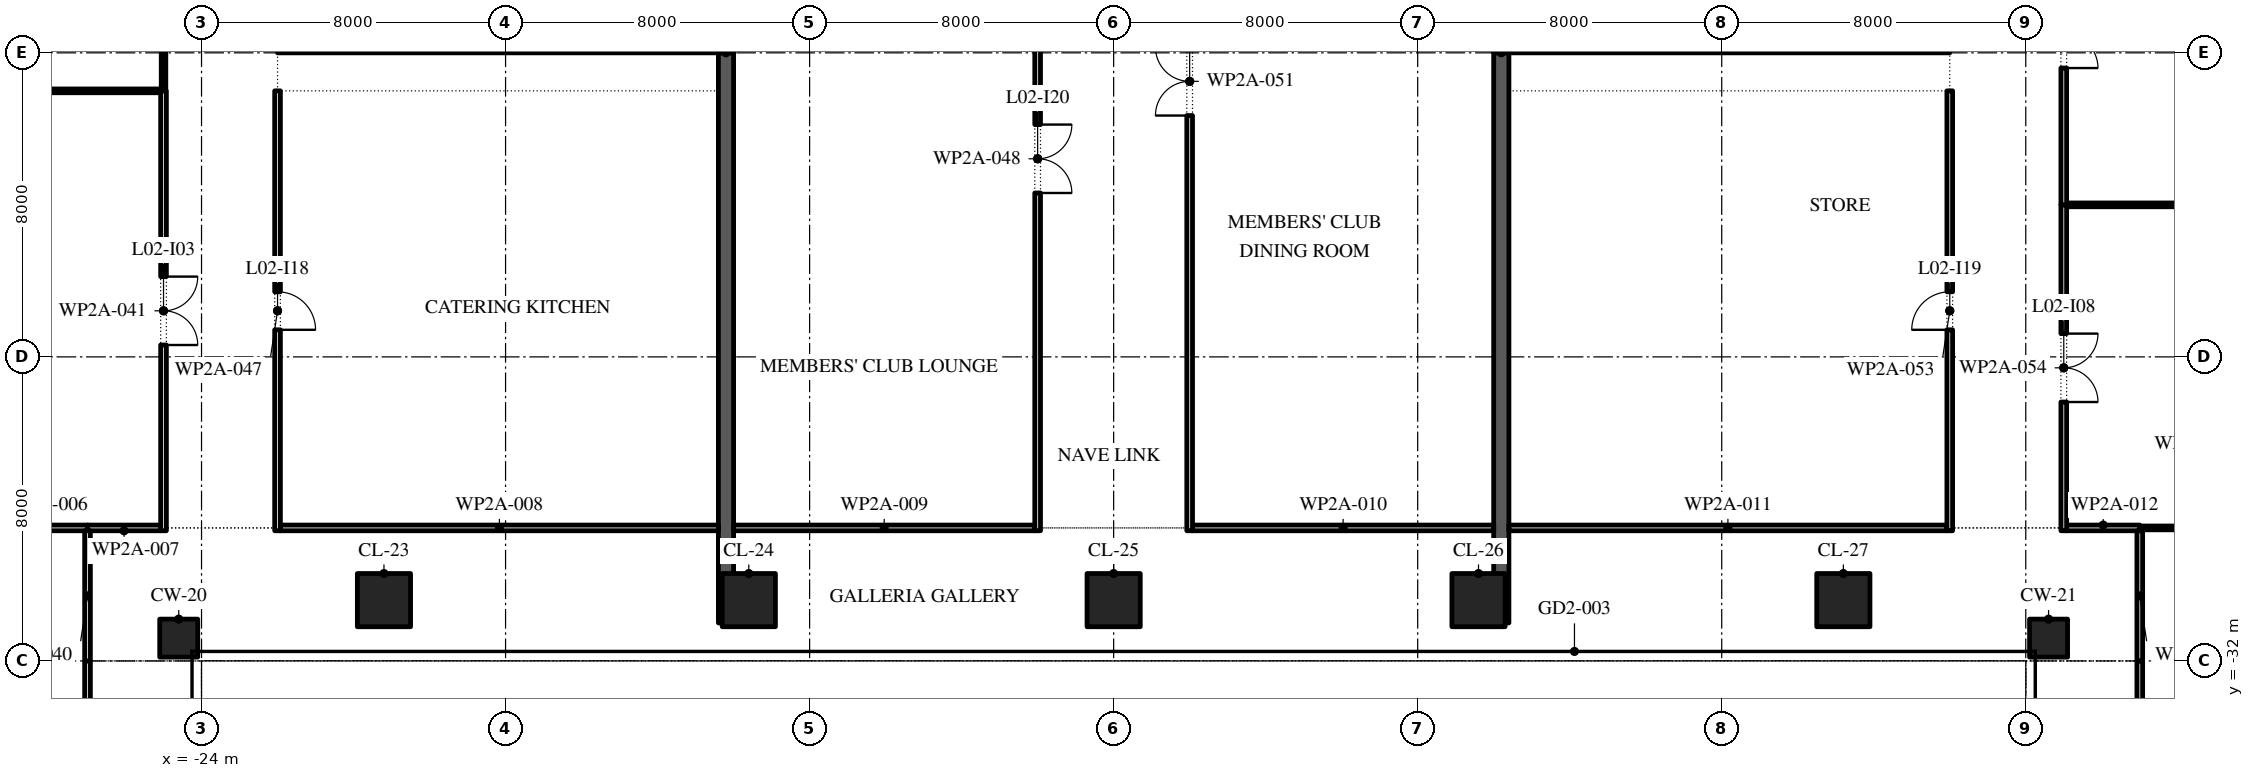
"""IFC4 building model, lengths in metres.
Left out: names, types, materials, properties, quantities, classifications, styles, units other than length and angle.
Written with IfcOpenShell. Run it as: python <this file> out.ifc"""

import sys

from ifc_helpers import new_model, si_unit, direction, frame, frame_2d, origin, origin_2d, place, context, subcontext, project, spatial, rectangle, extrude, element, fill, save


model = new_model("IFC4")
c1 = context("Model", 3, precision=1e-05, world=origin(), true_north=direction((0.0, 1.0)))
c2 = subcontext(c1, "Body", "Model", "MODEL_VIEW")
j1 = project(units=[si_unit("LENGTHUNIT", "METRE"), si_unit("PLANEANGLEUNIT", "RADIAN")], contexts=[c1])
p1 = place(None, origin())
s1 = spatial("IfcSite", under=j1, at=p1, CompositionType="ELEMENT")
p2 = place(p1, origin())
s2 = spatial("IfcBuilding", under=s1, at=p2, CompositionType="ELEMENT")
p3 = place(p2, frame((0.0, 0.0, 14.0)))
s3 = spatial("IfcBuildingStorey", under=s2, at=p3, CompositionType="ELEMENT", Elevation=14.0)
for number, where, z_axis, x_axis in (
    (1, (-24.6, -31.4, 0.0), (0.0, 0.0, 1.0), (1.0, 0.0, 0.0)),
    (2, (24.6, -31.4, 0.0), (0.0, 0.0, 1.0), (1.0, 0.0, 0.0)),
):
    element("IfcColumn", number, at=place(p3, frame(where, z_axis=z_axis, x_axis=x_axis)), inside=s3, PredefinedType="COLUMN", context=c2, shape_type="SweptSolid", body=[
        extrude(rectangle(XDim=1.0, YDim=1.0, at=origin_2d()), origin(), (0.0, 0.0, 1.0), 5.2),
    ])
for number, where, z_axis, x_axis in (
    (3, (-19.2, -30.4, 0.0), (0.0, 0.0, 1.0), (1.0, 0.0, 0.0)),
    (4, (-9.6, -30.4, 0.0), (0.0, 0.0, 1.0), (1.0, 0.0, 0.0)),
    (5, (0.0, -30.4, 0.0), (0.0, 0.0, 1.0), (1.0, 0.0, 0.0)),
    (6, (9.6, -30.4, 0.0), (0.0, 0.0, 1.0), (1.0, 0.0, 0.0)),
    (7, (19.2, -30.4, 0.0), (0.0, 0.0, 1.0), (1.0, 0.0, 0.0)),
):
    element("IfcColumn", number, at=place(p3, frame(where, z_axis=z_axis, x_axis=x_axis)), inside=s3, PredefinedType="COLUMN", context=c2, shape_type="SweptSolid", body=[
        extrude(rectangle(XDim=1.4, YDim=1.4, at=origin_2d()), origin(), (0.0, 0.0, 1.0), 5.2),
    ])
for number, where, z_axis, x_axis in (
    (8, (-10.2, -31.0, 0.0), (0.0, 0.0, 1.0), (0.0, 1.0, 0.0)),
    (9, (10.2, -31.0, 0.0), (0.0, 0.0, 1.0), (0.0, 1.0, 0.0)),
):
    element("IfcWall", number, at=place(p3, frame(where, z_axis=z_axis, x_axis=x_axis)), inside=s3, PredefinedType="SHEAR", context=c2, shape_type="SweptSolid", body=[
        extrude(rectangle(XDim=15.0, YDim=0.4, at=frame_2d((7.5, 0.0))), origin(), (0.0, 0.0, 1.0), 4.9),
    ])
p4 = place(p3, frame((-29.9, -28.5, 0.0), z_axis=(0.0, 0.0, 1.0), x_axis=(1.0, 0.0, 0.0)))
e10 = element("IfcWall", 10, at=p4, inside=s3, PredefinedType="PARTITIONING", context=c2, shape_type="SweptSolid", body=[
    extrude(rectangle(XDim=2.9, YDim=0.15, at=frame_2d((1.45, 0.0))), origin(), (0.0, 0.0, 1.0), 4.9),
])
p5 = place(p3, frame((-27.0, -28.5, 0.0), z_axis=(0.0, 0.0, 1.0), x_axis=(1.0, 0.0, 0.0)))
e11 = element("IfcWall", 11, at=p5, inside=s3, PredefinedType="PARTITIONING", context=c2, shape_type="SweptSolid", body=[
    extrude(rectangle(XDim=1.925, YDim=0.15, at=frame_2d((0.962, 0.0))), origin(), (0.0, 0.0, 1.0), 4.9),
])
p6 = place(p3, frame((-21.925, -28.5, 0.0), z_axis=(0.0, 0.0, 1.0), x_axis=(1.0, 0.0, 0.0)))
e12 = element("IfcWall", 12, at=p6, inside=s3, PredefinedType="PARTITIONING", context=c2, shape_type="SweptSolid", body=[
    extrude(rectangle(XDim=11.525, YDim=0.15, at=frame_2d((5.763, 0.0))), origin(), (0.0, 0.0, 1.0), 4.9),
])
for number, where, z_axis, x_axis in (
    (13, (-10.0, -28.5, 0.0), (0.0, 0.0, 1.0), (1.0, 0.0, 0.0)),
    (14, (2.075, -28.5, 0.0), (0.0, 0.0, 1.0), (1.0, 0.0, 0.0)),
):
    element("IfcWall", number, at=place(p3, frame(where, z_axis=z_axis, x_axis=x_axis)), inside=s3, PredefinedType="PARTITIONING", context=c2, shape_type="SweptSolid", body=[
        extrude(rectangle(XDim=7.925, YDim=0.15, at=frame_2d((3.962, 0.0))), origin(), (0.0, 0.0, 1.0), 4.9),
    ])
p7 = place(p3, frame((10.4, -28.5, 0.0), z_axis=(0.0, 0.0, 1.0), x_axis=(1.0, 0.0, 0.0)))
e15 = element("IfcWall", 15, at=p7, inside=s3, PredefinedType="PARTITIONING", context=c2, shape_type="SweptSolid", body=[
    extrude(rectangle(XDim=11.525, YDim=0.15, at=frame_2d((5.763, 0.0))), origin(), (0.0, 0.0, 1.0), 4.9),
])
p8 = place(p3, frame((25.075, -28.5, 0.0), z_axis=(0.0, 0.0, 1.0), x_axis=(1.0, 0.0, 0.0)))
e16 = element("IfcWall", 16, at=p8, inside=s3, PredefinedType="PARTITIONING", context=c2, shape_type="SweptSolid", body=[
    extrude(rectangle(XDim=1.925, YDim=0.15, at=frame_2d((0.962, 0.0))), origin(), (0.0, 0.0, 1.0), 4.9),
])
p9 = place(p3, frame((27.0, -28.5, 0.0), z_axis=(0.0, 0.0, 1.0), x_axis=(1.0, 0.0, 0.0)))
e17 = element("IfcWall", 17, at=p9, inside=s3, PredefinedType="PARTITIONING", context=c2, shape_type="SweptSolid", body=[
    extrude(rectangle(XDim=2.9, YDim=0.1, at=frame_2d((1.45, 0.0))), origin(), (0.0, 0.0, 1.0), 4.9),
])
for number, where, z_axis, x_axis in (
    (18, (25.075, -20.0, 0.0), (0.0, 0.0, 1.0), (1.0, 0.0, 0.0)),
    (19, (-43.5, -17.0, 0.0), (0.0, 0.0, 1.0), (1.0, 0.0, 0.0)),
):
    element("IfcWall", number, at=place(p3, frame(where, z_axis=z_axis, x_axis=x_axis)), inside=s3, PredefinedType="PARTITIONING", context=c2, shape_type="SweptSolid", body=[
        extrude(rectangle(XDim=18.425, YDim=0.1, at=frame_2d((9.212, 0.0))), origin(), (0.0, 0.0, 1.0), 4.9),
    ])
p10 = place(p3, frame((-27.0, -42.0, 0.0), z_axis=(0.0, 0.0, 1.0), x_axis=(0.0, 1.0, 0.0)))
e20 = element("IfcWall", 20, at=p10, inside=s3, PredefinedType="PARTITIONING", context=c2, shape_type="SweptSolid", body=[
    extrude(rectangle(XDim=10.0, YDim=0.15, at=frame_2d((5.0, 0.0))), origin(), (0.0, 0.0, 1.0), 4.9),
])
p11 = place(p10, frame((4.1, 0.0, 0.0)))
e21 = element("IfcOpeningElement", 21, at=p11, cuts=e20, PredefinedType="OPENING", context=c2, shape_type="SweptSolid", body=[
    extrude(rectangle(XDim=1.8, YDim=2.1, at=frame_2d((0.9, 1.05))), frame((0.0, 0.085, 0.0), z_axis=(0.0, -1.0, 0.0), x_axis=(1.0, 0.0, 0.0)), (0.0, 0.0, 1.0), 0.17),
])
p12 = place(p3, frame((-27.0, -32.0, 0.0), z_axis=(0.0, 0.0, 1.0), x_axis=(0.0, 1.0, 0.0)))
e22 = element("IfcWall", 22, at=p12, inside=s3, PredefinedType="PARTITIONING", context=c2, shape_type="SweptSolid", body=[
    extrude(rectangle(XDim=3.425, YDim=0.15, at=frame_2d((1.712, 0.0))), origin(), (0.0, 0.0, 1.0), 4.9),
])
p13 = place(p3, frame((-25.0, -28.575, 0.0), z_axis=(0.0, 0.0, 1.0), x_axis=(0.0, 1.0, 0.0)))
e23 = element("IfcWall", 23, at=p13, inside=s3, PredefinedType="PARTITIONING", context=c2, shape_type="SweptSolid", body=[
    extrude(rectangle(XDim=11.575, YDim=0.15, at=frame_2d((5.788, 0.0))), origin(), (0.0, 0.0, 1.0), 4.9),
])
p14 = place(p13, frame((4.887, 0.0, 0.0)))
e24 = element("IfcOpeningElement", 24, at=p14, cuts=e23, PredefinedType="OPENING", context=c2, shape_type="SweptSolid", body=[
    extrude(rectangle(XDim=1.8, YDim=2.1, at=frame_2d((0.9, 1.05))), frame((0.0, 0.085, 0.0), z_axis=(0.0, -1.0, 0.0), x_axis=(1.0, 0.0, 0.0)), (0.0, 0.0, 1.0), 0.17),
])
p15 = place(p3, frame((-25.0, -17.0, 0.0), z_axis=(0.0, 0.0, 1.0), x_axis=(0.0, 1.0, 0.0)))
e25 = element("IfcWall", 25, at=p15, inside=s3, PredefinedType="PARTITIONING", context=c2, shape_type="SweptSolid", body=[
    extrude(rectangle(XDim=11.0, YDim=0.12, at=frame_2d((5.5, 0.0))), origin(), (0.0, 0.0, 1.0), 4.9),
])
p16 = place(p15, frame((4.6, 0.0, 0.0)))
e26 = element("IfcOpeningElement", 26, at=p16, cuts=e25, PredefinedType="OPENING", context=c2, shape_type="SweptSolid", body=[
    extrude(rectangle(XDim=1.8, YDim=2.1, at=frame_2d((0.9, 1.05))), frame((0.0, 0.07, 0.0), z_axis=(0.0, -1.0, 0.0), x_axis=(1.0, 0.0, 0.0)), (0.0, 0.0, 1.0), 0.14),
])
p17 = place(p3, frame((-22.0, -28.575, 0.0), z_axis=(0.0, 0.0, 1.0), x_axis=(0.0, 1.0, 0.0)))
e27 = element("IfcWall", 27, at=p17, inside=s3, PredefinedType="PARTITIONING", context=c2, shape_type="SweptSolid", body=[
    extrude(rectangle(XDim=11.575, YDim=0.15, at=frame_2d((5.788, 0.0))), origin(), (0.0, 0.0, 1.0), 4.9),
])
p18 = place(p17, frame((5.288, 0.0, 0.0)))
e28 = element("IfcOpeningElement", 28, at=p18, cuts=e27, PredefinedType="OPENING", context=c2, shape_type="SweptSolid", body=[
    extrude(rectangle(XDim=1.0, YDim=2.1, at=frame_2d((0.5, 1.05))), frame((0.0, 0.085, 0.0), z_axis=(0.0, -1.0, 0.0), x_axis=(1.0, 0.0, 0.0)), (0.0, 0.0, 1.0), 0.17),
])
p19 = place(p3, frame((-2.0, -28.575, 0.0), z_axis=(0.0, 0.0, 1.0), x_axis=(0.0, 1.0, 0.0)))
e29 = element("IfcWall", 29, at=p19, inside=s3, PredefinedType="PARTITIONING", context=c2, shape_type="SweptSolid", body=[
    extrude(rectangle(XDim=19.575, YDim=0.15, at=frame_2d((9.788, 0.0))), origin(), (0.0, 0.0, 1.0), 4.9),
])
p20 = place(p19, frame((8.887, 0.0, 0.0)))
e30 = element("IfcOpeningElement", 30, at=p20, cuts=e29, PredefinedType="OPENING", context=c2, shape_type="SweptSolid", body=[
    extrude(rectangle(XDim=1.8, YDim=2.1, at=frame_2d((0.9, 1.05))), frame((0.0, 0.085, 0.0), z_axis=(0.0, -1.0, 0.0), x_axis=(1.0, 0.0, 0.0)), (0.0, 0.0, 1.0), 0.17),
])
p21 = place(p3, frame((2.0, -28.575, 0.0), z_axis=(0.0, 0.0, 1.0), x_axis=(0.0, 1.0, 0.0)))
e31 = element("IfcWall", 31, at=p21, inside=s3, PredefinedType="PARTITIONING", context=c2, shape_type="SweptSolid", body=[
    extrude(rectangle(XDim=23.65, YDim=0.15, at=frame_2d((11.825, 0.0))), origin(), (0.0, 0.0, 1.0), 4.9),
])
p22 = place(p21, frame((10.925, 0.0, 0.0)))
e32 = element("IfcOpeningElement", 32, at=p22, cuts=e31, PredefinedType="OPENING", context=c2, shape_type="SweptSolid", body=[
    extrude(rectangle(XDim=1.8, YDim=2.1, at=frame_2d((0.9, 1.05))), frame((0.0, 0.085, 0.0), z_axis=(0.0, -1.0, 0.0), x_axis=(1.0, 0.0, 0.0)), (0.0, 0.0, 1.0), 0.17),
])
p23 = place(p3, frame((22.0, -28.575, 0.0), z_axis=(0.0, 0.0, 1.0), x_axis=(0.0, 1.0, 0.0)))
e33 = element("IfcWall", 33, at=p23, inside=s3, PredefinedType="PARTITIONING", context=c2, shape_type="SweptSolid", body=[
    extrude(rectangle(XDim=11.575, YDim=0.15, at=frame_2d((5.788, 0.0))), origin(), (0.0, 0.0, 1.0), 4.9),
])
p24 = place(p23, frame((5.288, 0.0, 0.0)))
e34 = element("IfcOpeningElement", 34, at=p24, cuts=e33, PredefinedType="OPENING", context=c2, shape_type="SweptSolid", body=[
    extrude(rectangle(XDim=1.0, YDim=2.1, at=frame_2d((0.5, 1.05))), frame((0.0, 0.085, 0.0), z_axis=(0.0, -1.0, 0.0), x_axis=(1.0, 0.0, 0.0)), (0.0, 0.0, 1.0), 0.17),
])
p25 = place(p3, frame((25.0, -28.575, 0.0), z_axis=(0.0, 0.0, 1.0), x_axis=(0.0, 1.0, 0.0)))
e35 = element("IfcWall", 35, at=p25, inside=s3, PredefinedType="PARTITIONING", context=c2, shape_type="SweptSolid", body=[
    extrude(rectangle(XDim=8.575, YDim=0.15, at=frame_2d((4.288, 0.0))), origin(), (0.0, 0.0, 1.0), 4.9),
])
p26 = place(p25, frame((3.387, 0.0, 0.0)))
e36 = element("IfcOpeningElement", 36, at=p26, cuts=e35, PredefinedType="OPENING", context=c2, shape_type="SweptSolid", body=[
    extrude(rectangle(XDim=1.8, YDim=2.1, at=frame_2d((0.9, 1.05))), frame((0.0, 0.085, 0.0), z_axis=(0.0, -1.0, 0.0), x_axis=(1.0, 0.0, 0.0)), (0.0, 0.0, 1.0), 0.17),
])
p27 = place(p3, frame((25.0, -20.0, 0.0), z_axis=(0.0, 0.0, 1.0), x_axis=(0.0, 1.0, 0.0)))
e37 = element("IfcWall", 37, at=p27, inside=s3, PredefinedType="PARTITIONING", context=c2, shape_type="SweptSolid", body=[
    extrude(rectangle(XDim=9.0, YDim=0.15, at=frame_2d((4.5, 0.0))), origin(), (0.0, 0.0, 1.0), 4.9),
])
p28 = place(p27, frame((3.6, 0.0, 0.0)))
e38 = element("IfcOpeningElement", 38, at=p28, cuts=e37, PredefinedType="OPENING", context=c2, shape_type="SweptSolid", body=[
    extrude(rectangle(XDim=1.8, YDim=2.1, at=frame_2d((0.9, 1.05))), frame((0.0, 0.085, 0.0), z_axis=(0.0, -1.0, 0.0), x_axis=(1.0, 0.0, 0.0)), (0.0, 0.0, 1.0), 0.17),
])
p29 = place(p3, frame((27.0, -42.0, 0.0), z_axis=(0.0, 0.0, 1.0), x_axis=(0.0, 1.0, 0.0)))
e39 = element("IfcWall", 39, at=p29, inside=s3, PredefinedType="PARTITIONING", context=c2, shape_type="SweptSolid", body=[
    extrude(rectangle(XDim=10.0, YDim=0.15, at=frame_2d((5.0, 0.0))), origin(), (0.0, 0.0, 1.0), 4.9),
])
p30 = place(p29, frame((4.1, 0.0, 0.0)))
e40 = element("IfcOpeningElement", 40, at=p30, cuts=e39, PredefinedType="OPENING", context=c2, shape_type="SweptSolid", body=[
    extrude(rectangle(XDim=1.8, YDim=2.1, at=frame_2d((0.9, 1.05))), frame((0.0, 0.085, 0.0), z_axis=(0.0, -1.0, 0.0), x_axis=(1.0, 0.0, 0.0)), (0.0, 0.0, 1.0), 0.17),
])
p31 = place(p3, frame((27.0, -32.0, 0.0), z_axis=(0.0, 0.0, 1.0), x_axis=(0.0, 1.0, 0.0)))
e41 = element("IfcWall", 41, at=p31, inside=s3, PredefinedType="PARTITIONING", context=c2, shape_type="SweptSolid", body=[
    extrude(rectangle(XDim=3.425, YDim=0.15, at=frame_2d((1.712, 0.0))), origin(), (0.0, 0.0, 1.0), 4.9),
])
p32 = place(p14, frame((1.8, 0.0, 0.0), z_axis=(0.0, 0.0, 1.0), x_axis=(-1.0, 0.0, 0.0)))
e42 = element("IfcDoor", 42, at=p32, inside=s3, OperationType="SINGLE_SWING_RIGHT", PredefinedType="DOOR", context=c2, shape_type="SweptSolid", body=[
    extrude(rectangle(XDim=1.8, YDim=2.1, at=frame_2d((0.9, 1.05))), frame((0.0, 0.025, 0.0), z_axis=(0.0, -1.0, 0.0), x_axis=(1.0, 0.0, 0.0)), (0.0, 0.0, 1.0), 0.05),
])
fill(e24, e42)
p33 = place(p26, frame((1.8, 0.0, 0.0), z_axis=(0.0, 0.0, 1.0), x_axis=(-1.0, 0.0, 0.0)))
e43 = element("IfcDoor", 43, at=p33, inside=s3, OperationType="SINGLE_SWING_RIGHT", PredefinedType="DOOR", context=c2, shape_type="SweptSolid", body=[
    extrude(rectangle(XDim=1.8, YDim=2.1, at=frame_2d((0.9, 1.05))), frame((0.0, 0.025, 0.0), z_axis=(0.0, -1.0, 0.0), x_axis=(1.0, 0.0, 0.0)), (0.0, 0.0, 1.0), 0.05),
])
fill(e36, e43)
p34 = place(p28, frame((1.8, 0.0, 0.0), z_axis=(0.0, 0.0, 1.0), x_axis=(-1.0, 0.0, 0.0)))
e44 = element("IfcDoor", 44, at=p34, inside=s3, OperationType="SINGLE_SWING_RIGHT", PredefinedType="DOOR", context=c2, shape_type="SweptSolid", body=[
    extrude(rectangle(XDim=1.8, YDim=2.1, at=frame_2d((0.9, 1.05))), frame((0.0, 0.025, 0.0), z_axis=(0.0, -1.0, 0.0), x_axis=(1.0, 0.0, 0.0)), (0.0, 0.0, 1.0), 0.05),
])
fill(e38, e44)
p35 = place(p18, frame((1.0, 0.0, 0.0), z_axis=(0.0, 0.0, 1.0), x_axis=(-1.0, 0.0, 0.0)))
e45 = element("IfcDoor", 45, at=p35, inside=s3, OperationType="SINGLE_SWING_LEFT", PredefinedType="DOOR", context=c2, shape_type="SweptSolid", body=[
    extrude(rectangle(XDim=1.0, YDim=2.1, at=frame_2d((0.5, 1.05))), frame((0.0, 0.025, 0.0), z_axis=(0.0, -1.0, 0.0), x_axis=(1.0, 0.0, 0.0)), (0.0, 0.0, 1.0), 0.05),
])
fill(e28, e45)
p36 = place(p24, origin())
e46 = element("IfcDoor", 46, at=p36, inside=s3, OperationType="SINGLE_SWING_RIGHT", PredefinedType="DOOR", context=c2, shape_type="SweptSolid", body=[
    extrude(rectangle(XDim=1.0, YDim=2.1, at=frame_2d((0.5, 1.05))), frame((0.0, 0.025, 0.0), z_axis=(0.0, -1.0, 0.0), x_axis=(1.0, 0.0, 0.0)), (0.0, 0.0, 1.0), 0.05),
])
fill(e34, e46)
p37 = place(p20, frame((1.8, 0.0, 0.0), z_axis=(0.0, 0.0, 1.0), x_axis=(-1.0, 0.0, 0.0)))
e47 = element("IfcDoor", 47, at=p37, inside=s3, OperationType="SINGLE_SWING_RIGHT", PredefinedType="DOOR", context=c2, shape_type="SweptSolid", body=[
    extrude(rectangle(XDim=1.8, YDim=2.1, at=frame_2d((0.9, 1.05))), frame((0.0, 0.025, 0.0), z_axis=(0.0, -1.0, 0.0), x_axis=(1.0, 0.0, 0.0)), (0.0, 0.0, 1.0), 0.05),
])
fill(e30, e47)
p38 = place(p22, origin())
e48 = element("IfcDoor", 48, at=p38, inside=s3, OperationType="SINGLE_SWING_LEFT", PredefinedType="DOOR", context=c2, shape_type="SweptSolid", body=[
    extrude(rectangle(XDim=1.8, YDim=2.1, at=frame_2d((0.9, 1.05))), frame((0.0, 0.025, 0.0), z_axis=(0.0, -1.0, 0.0), x_axis=(1.0, 0.0, 0.0)), (0.0, 0.0, 1.0), 0.05),
])
fill(e32, e48)
save(model, sys.argv[1])
